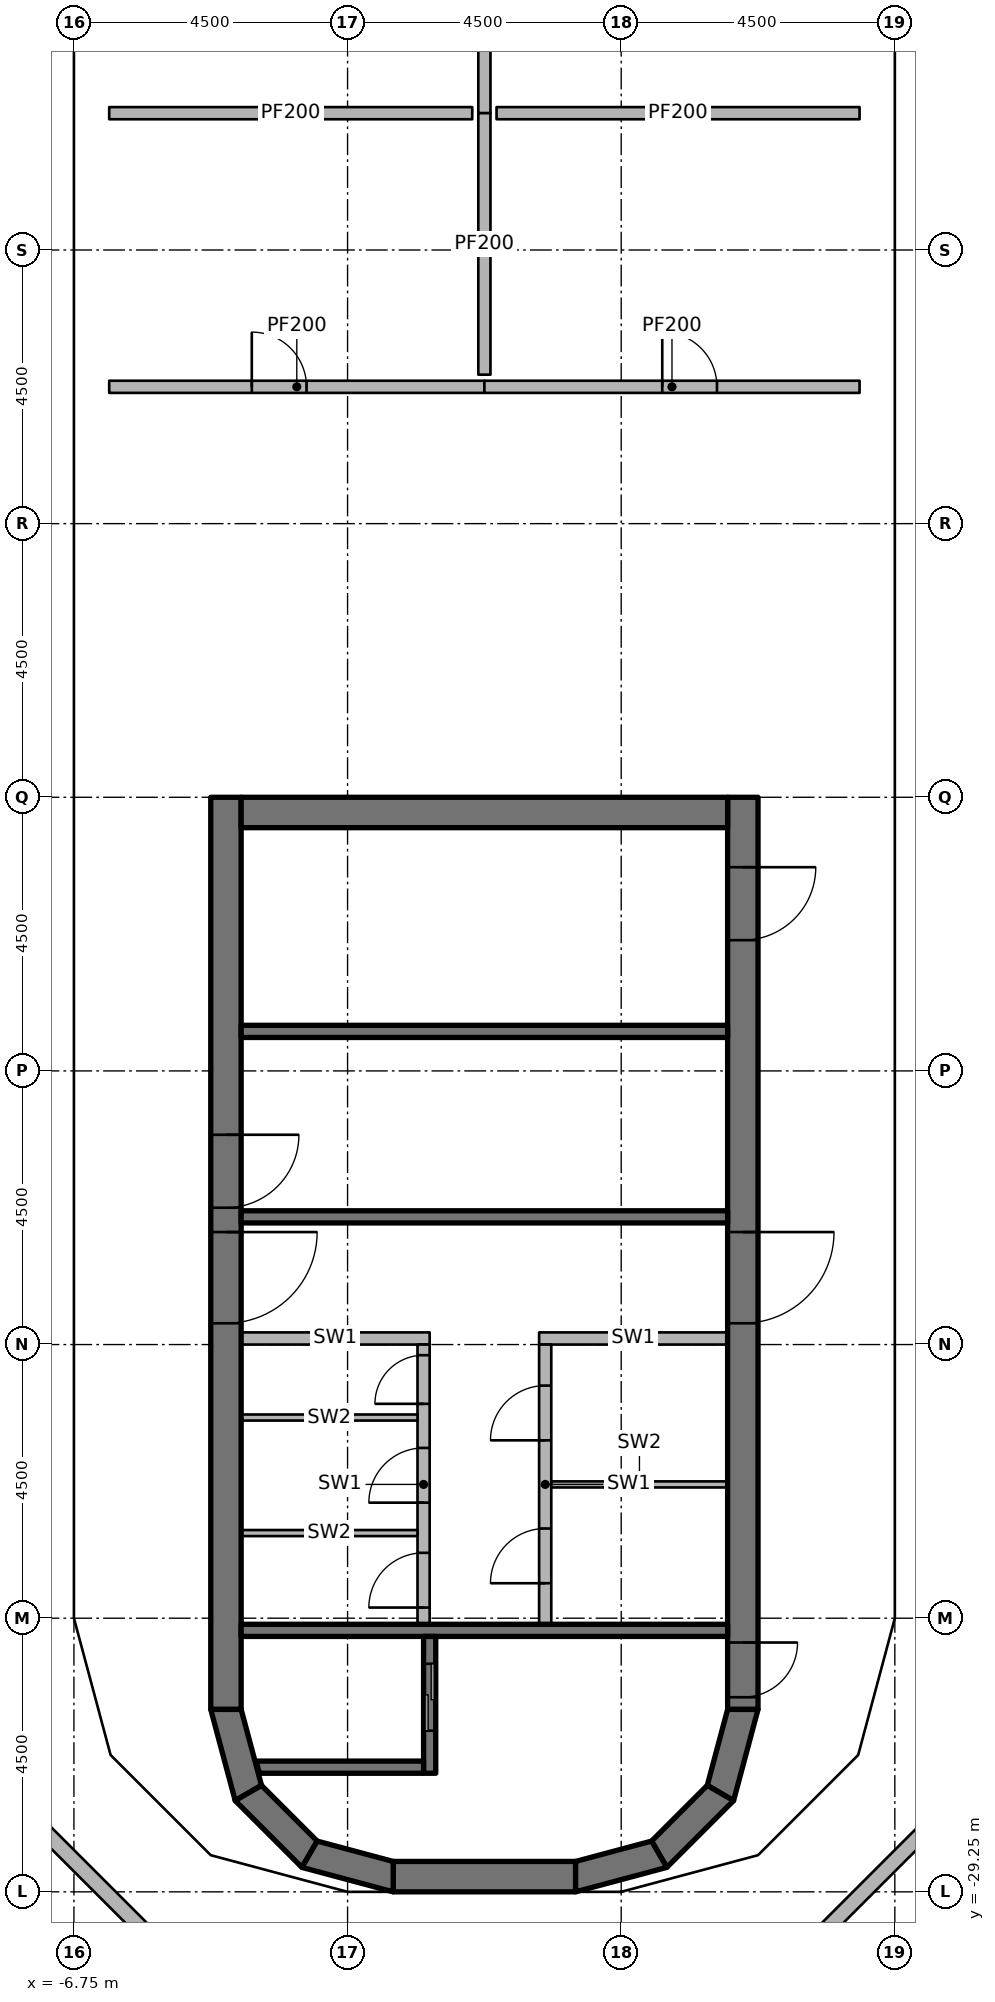
"""IFC4 building model, lengths in metres.
Left out: names, types, materials, properties, quantities, classifications, styles, units other than length and angle.
Written with IfcOpenShell. Run it as: python <this file> out.ifc"""

import sys

from ifc_helpers import new_model, si_unit, direction, frame, frame_2d, origin, origin_2d, place, context, subcontext, project, spatial, polyline, rectangle, outline, extrude, element, fill, save


model = new_model("IFC4")
c1 = context("Model", 3, precision=1e-05, world=origin(), true_north=direction((0.0, 1.0)))
c2 = subcontext(c1, "Body", "Model", "MODEL_VIEW")
j1 = project(units=[si_unit("LENGTHUNIT", "METRE"), si_unit("PLANEANGLEUNIT", "RADIAN")], contexts=[c1])
p1 = place(None, origin())
s1 = spatial("IfcSite", under=j1, at=p1, CompositionType="ELEMENT")
p2 = place(p1, origin())
s2 = spatial("IfcBuilding", under=s1, at=p2, CompositionType="ELEMENT")
p3 = place(p2, frame((0.0, 0.0, 309.6)))
s3 = spatial("IfcBuildingStorey", under=s2, at=p3, CompositionType="ELEMENT", Elevation=309.6)
for number, where, z_axis, x_axis in (
    (1, (-6.25, -24.65, 0.0), (0.0, 0.0, 1.0), (1.0, 0.0, 0.0)),
    (2, (-6.25, -20.25, 0.0), (0.0, 0.0, 1.0), (1.0, 0.0, 0.0)),
    (3, (-6.25, -15.75, 0.0), (0.0, 0.0, 1.0), (1.0, 0.0, 0.0)),
    (4, (-6.25, -10.75, 0.0), (0.0, 0.0, 1.0), (1.0, 0.0, 0.0)),
    (5, (-6.25, -6.25, 0.0), (0.0, 0.0, 1.0), (1.0, 0.0, 0.0)),
    (6, (6.25, -24.65, 0.0), (0.0, 0.0, 1.0), (1.0, 0.0, 0.0)),
    (7, (6.25, -20.25, 0.0), (0.0, 0.0, 1.0), (1.0, 0.0, 0.0)),
    (8, (6.25, -15.75, 0.0), (0.0, 0.0, 1.0), (1.0, 0.0, 0.0)),
    (9, (6.25, -10.75, 0.0), (0.0, 0.0, 1.0), (1.0, 0.0, 0.0)),
    (10, (6.25, -6.25, 0.0), (0.0, 0.0, 1.0), (1.0, 0.0, 0.0)),
):
    element("IfcColumn", number, at=place(p3, frame(where, z_axis=z_axis, x_axis=x_axis)), inside=s3, PredefinedType="COLUMN", context=c2, shape_type="SweptSolid", body=[
        extrude(rectangle(XDim=0.6, YDim=0.6, at=origin_2d()), origin(), (0.0, 0.0, 1.0), 3.45),
    ])
p4 = place(p3, frame((-4.25, -11.25, 0.0), z_axis=(0.0, 0.0, 1.0), x_axis=(0.0, -1.0, 0.0)))
e11 = element("IfcWall", 11, at=p4, inside=s3, PredefinedType="SHEAR", context=c2, shape_type="SweptSolid", body=[
    extrude(rectangle(XDim=15.0, YDim=0.5, at=frame_2d((7.5, 0.0))), origin(), (0.0, 0.0, 1.0), 3.6),
])
p5 = place(p4, frame((7.15, 0.0, 0.0)))
e12 = element("IfcOpeningElement", 12, at=p5, cuts=e11, PredefinedType="OPENING", context=c2, shape_type="SweptSolid", body=[
    extrude(rectangle(XDim=1.5, YDim=2.3, at=frame_2d((0.75, 1.15))), frame((0.0, 0.26, 0.0), z_axis=(0.0, -1.0, 0.0), x_axis=(1.0, 0.0, 0.0)), (0.0, 0.0, 1.0), 0.52),
])
p6 = place(p4, frame((5.55, 0.0, 0.0)))
e13 = element("IfcOpeningElement", 13, at=p6, cuts=e11, PredefinedType="OPENING", context=c2, shape_type="SweptSolid", body=[
    extrude(rectangle(XDim=1.2, YDim=2.1, at=frame_2d((0.6, 1.05))), frame((0.0, 0.26, 0.0), z_axis=(0.0, -1.0, 0.0), x_axis=(1.0, 0.0, 0.0)), (0.0, 0.0, 1.0), 0.52),
])
p7 = place(p3, frame((4.25, -11.25, 0.0), z_axis=(0.0, 0.0, 1.0), x_axis=(0.0, -1.0, 0.0)))
e14 = element("IfcWall", 14, at=p7, inside=s3, PredefinedType="SHEAR", context=c2, shape_type="SweptSolid", body=[
    extrude(rectangle(XDim=15.0, YDim=0.5, at=frame_2d((7.5, 0.0))), origin(), (0.0, 0.0, 1.0), 3.6),
])
p8 = place(p7, frame((7.15, 0.0, 0.0)))
e15 = element("IfcOpeningElement", 15, at=p8, cuts=e14, PredefinedType="OPENING", context=c2, shape_type="SweptSolid", body=[
    extrude(rectangle(XDim=1.5, YDim=2.3, at=frame_2d((0.75, 1.15))), frame((0.0, 0.26, 0.0), z_axis=(0.0, -1.0, 0.0), x_axis=(1.0, 0.0, 0.0)), (0.0, 0.0, 1.0), 0.52),
])
p9 = place(p7, frame((13.9, 0.0, 0.0)))
e16 = element("IfcOpeningElement", 16, at=p9, cuts=e14, PredefinedType="OPENING", context=c2, shape_type="SweptSolid", body=[
    extrude(rectangle(XDim=0.9, YDim=2.1, at=frame_2d((0.45, 1.05))), frame((0.0, 0.26, 0.0), z_axis=(0.0, -1.0, 0.0), x_axis=(1.0, 0.0, 0.0)), (0.0, 0.0, 1.0), 0.52),
])
p10 = place(p7, frame((1.15, 0.0, 0.0)))
e17 = element("IfcOpeningElement", 17, at=p10, cuts=e14, PredefinedType="OPENING", context=c2, shape_type="SweptSolid", body=[
    extrude(rectangle(XDim=1.2, YDim=2.1, at=frame_2d((0.6, 1.05))), frame((0.0, 0.26, 0.0), z_axis=(0.0, -1.0, 0.0), x_axis=(1.0, 0.0, 0.0)), (0.0, 0.0, 1.0), 0.52),
])
p11 = place(p3, frame((-4.0, -11.5, 0.0), z_axis=(0.0, 0.0, 1.0), x_axis=(1.0, 0.0, 0.0)))
e18 = element("IfcWall", 18, at=p11, inside=s3, PredefinedType="SHEAR", context=c2, shape_type="SweptSolid", body=[
    extrude(rectangle(XDim=8.0, YDim=0.5, at=frame_2d((4.0, 0.0))), origin(), (0.0, 0.0, 1.0), 3.6),
])
p12 = place(p3, frame((-1.5, -29.0, 0.0), z_axis=(0.0, 0.0, 1.0), x_axis=(1.0, 0.0, 0.0)))
e19 = element("IfcWall", 19, at=p12, inside=s3, PredefinedType="SHEAR", context=c2, shape_type="SweptSolid", body=[
    extrude(rectangle(XDim=3.0, YDim=0.5, at=frame_2d((1.5, 0.0))), origin(), (0.0, 0.0, 1.0), 3.6),
])
p13 = place(p3, origin())
e20 = element("IfcWall", 20, at=p13, inside=s3, PredefinedType="SHEAR", context=c2, shape_type="SweptSolid", body=[
    extrude(outline(polyline([(-4.5, -26.25), (-4.098, -27.75), (-3.665, -27.5), (-4.0, -26.25), (-4.5, -26.25)])), origin(), (0.0, 0.0, 1.0), 3.6),
])
p14 = place(p3, origin())
e21 = element("IfcWall", 21, at=p14, inside=s3, PredefinedType="SHEAR", context=c2, shape_type="SweptSolid", body=[
    extrude(outline(polyline([(-4.098, -27.75), (-3.0, -28.848), (-2.75, -28.415), (-3.665, -27.5), (-4.098, -27.75)])), origin(), (0.0, 0.0, 1.0), 3.6),
])
p15 = place(p3, origin())
e22 = element("IfcWall", 22, at=p15, inside=s3, PredefinedType="SHEAR", context=c2, shape_type="SweptSolid", body=[
    extrude(outline(polyline([(-3.0, -28.848), (-1.5, -29.25), (-1.5, -28.75), (-2.75, -28.415), (-3.0, -28.848)])), origin(), (0.0, 0.0, 1.0), 3.6),
])
p16 = place(p3, origin())
e23 = element("IfcWall", 23, at=p16, inside=s3, PredefinedType="SHEAR", context=c2, shape_type="SweptSolid", body=[
    extrude(outline(polyline([(4.5, -26.25), (4.098, -27.75), (3.665, -27.5), (4.0, -26.25), (4.5, -26.25)])), origin(), (0.0, 0.0, 1.0), 3.6),
])
p17 = place(p3, origin())
e24 = element("IfcWall", 24, at=p17, inside=s3, PredefinedType="SHEAR", context=c2, shape_type="SweptSolid", body=[
    extrude(outline(polyline([(4.098, -27.75), (3.0, -28.848), (2.75, -28.415), (3.665, -27.5), (4.098, -27.75)])), origin(), (0.0, 0.0, 1.0), 3.6),
])
p18 = place(p3, origin())
e25 = element("IfcWall", 25, at=p18, inside=s3, PredefinedType="SHEAR", context=c2, shape_type="SweptSolid", body=[
    extrude(outline(polyline([(3.0, -28.848), (1.5, -29.25), (1.5, -28.75), (2.75, -28.415), (3.0, -28.848)])), origin(), (0.0, 0.0, 1.0), 3.6),
])
p19 = place(p3, origin())
e26 = element("IfcWall", 26, at=p19, inside=s3, PredefinedType="PARAPET", context=c2, shape_type="SweptSolid", body=[
    extrude(outline(polyline([(-5.421, -30.243), (-7.743, -27.921), (-7.519, -27.792), (-5.292, -30.019), (-5.421, -30.243)])), origin(), (0.0, 0.0, 1.0), 1.22),
])
p20 = place(p3, origin())
e27 = element("IfcWall", 27, at=p20, inside=s3, PredefinedType="PARAPET", context=c2, shape_type="SweptSolid", body=[
    extrude(outline(polyline([(7.743, -27.921), (5.421, -30.243), (5.292, -30.019), (7.519, -27.792), (7.743, -27.921)])), origin(), (0.0, 0.0, 1.0), 1.22),
])
p21 = place(p3, frame((4.0, -24.95, 0.0), z_axis=(0.0, 0.0, 1.0), x_axis=(-1.0, 0.0, 0.0)))
e28 = element("IfcWall", 28, at=p21, inside=s3, PredefinedType="SHEAR", context=c2, shape_type="SweptSolid", body=[
    extrude(rectangle(XDim=8.0, YDim=0.2, at=frame_2d((4.0, 0.0))), origin(), (0.0, 0.0, 1.0), 3.45),
])
p22 = place(p3, frame((-0.9, -27.3, 0.0), z_axis=(0.0, 0.0, 1.0), x_axis=(0.0, 1.0, 0.0)))
e29 = element("IfcWall", 29, at=p22, inside=s3, PredefinedType="SHEAR", context=c2, shape_type="SweptSolid", body=[
    extrude(rectangle(XDim=2.25, YDim=0.2, at=frame_2d((1.125, 0.0))), origin(), (0.0, 0.0, 1.0), 3.45),
])
p23 = place(p22, frame((0.7, 0.0, 0.0)))
e30 = element("IfcOpeningElement", 30, at=p23, cuts=e29, PredefinedType="OPENING", context=c2, shape_type="SweptSolid", body=[
    extrude(rectangle(XDim=1.1, YDim=2.3, at=frame_2d((0.55, 1.15))), frame((0.0, 0.11, 0.0), z_axis=(0.0, -1.0, 0.0), x_axis=(1.0, 0.0, 0.0)), (0.0, 0.0, 1.0), 0.22),
])
p24 = place(p3, origin())
e31 = element("IfcWall", 31, at=p24, inside=s3, PredefinedType="SHEAR", context=c2, shape_type="SweptSolid", body=[
    extrude(outline(polyline([(-1.0, -27.1), (-3.755, -27.1), (-3.701, -27.3), (-1.0, -27.3), (-1.0, -27.1)])), origin(), (0.0, 0.0, 1.0), 3.45),
])
for number, where, z_axis, x_axis in (
    (32, (4.0, -18.15, 0.0), (0.0, 0.0, 1.0), (-1.0, 0.0, 0.0)),
    (33, (4.0, -15.1, 0.0), (0.0, 0.0, 1.0), (-1.0, 0.0, 0.0)),
):
    element("IfcWall", number, at=place(p3, frame(where, z_axis=z_axis, x_axis=x_axis)), inside=s3, PredefinedType="SHEAR", context=c2, shape_type="SweptSolid", body=[
        extrude(rectangle(XDim=8.0, YDim=0.2, at=frame_2d((4.0, 0.0))), origin(), (0.0, 0.0, 1.0), 3.45),
    ])
p25 = place(p3, frame((4.0, -20.15, 0.0), z_axis=(0.0, 0.0, 1.0), x_axis=(-1.0, 0.0, 0.0)))
e34 = element("IfcWall", 34, at=p25, inside=s3, PredefinedType="PARTITIONING", context=c2, shape_type="SweptSolid", body=[
    extrude(rectangle(XDim=3.1, YDim=0.2, at=frame_2d((1.55, 0.0))), origin(), (0.0, 0.0, 1.0), 3.45),
])
p26 = place(p3, frame((1.0, -24.85, 0.0), z_axis=(0.0, 0.0, 1.0), x_axis=(0.0, 1.0, 0.0)))
e35 = element("IfcWall", 35, at=p26, inside=s3, PredefinedType="PARTITIONING", context=c2, shape_type="SweptSolid", body=[
    extrude(rectangle(XDim=4.6, YDim=0.2, at=frame_2d((2.3, 0.0))), origin(), (0.0, 0.0, 1.0), 3.45),
])
p27 = place(p26, frame((0.675, 0.0, 0.0)))
e36 = element("IfcOpeningElement", 36, at=p27, cuts=e35, PredefinedType="OPENING", context=c2, shape_type="SweptSolid", body=[
    extrude(rectangle(XDim=0.9, YDim=2.1, at=frame_2d((0.45, 1.05))), frame((0.0, 0.11, 0.0), z_axis=(0.0, -1.0, 0.0), x_axis=(1.0, 0.0, 0.0)), (0.0, 0.0, 1.0), 0.22),
])
p28 = place(p26, frame((3.025, 0.0, 0.0)))
e37 = element("IfcOpeningElement", 37, at=p28, cuts=e35, PredefinedType="OPENING", context=c2, shape_type="SweptSolid", body=[
    extrude(rectangle(XDim=0.9, YDim=2.1, at=frame_2d((0.45, 1.05))), frame((0.0, 0.11, 0.0), z_axis=(0.0, -1.0, 0.0), x_axis=(1.0, 0.0, 0.0)), (0.0, 0.0, 1.0), 0.22),
])
p29 = place(p3, frame((-0.9, -20.15, 0.0), z_axis=(0.0, 0.0, 1.0), x_axis=(-1.0, 0.0, 0.0)))
e38 = element("IfcWall", 38, at=p29, inside=s3, PredefinedType="PARTITIONING", context=c2, shape_type="SweptSolid", body=[
    extrude(rectangle(XDim=3.1, YDim=0.2, at=frame_2d((1.55, 0.0))), origin(), (0.0, 0.0, 1.0), 3.45),
])
p30 = place(p3, frame((-1.0, -24.85, 0.0), z_axis=(0.0, 0.0, 1.0), x_axis=(0.0, 1.0, 0.0)))
e39 = element("IfcWall", 39, at=p30, inside=s3, PredefinedType="PARTITIONING", context=c2, shape_type="SweptSolid", body=[
    extrude(rectangle(XDim=4.6, YDim=0.2, at=frame_2d((2.3, 0.0))), origin(), (0.0, 0.0, 1.0), 3.45),
])
p31 = place(p30, frame((0.275, 0.0, 0.0)))
e40 = element("IfcOpeningElement", 40, at=p31, cuts=e39, PredefinedType="OPENING", context=c2, shape_type="SweptSolid", body=[
    extrude(rectangle(XDim=0.9, YDim=2.1, at=frame_2d((0.45, 1.05))), frame((0.0, 0.11, 0.0), z_axis=(0.0, -1.0, 0.0), x_axis=(1.0, 0.0, 0.0)), (0.0, 0.0, 1.0), 0.22),
])
p32 = place(p30, frame((2.0, 0.0, 0.0)))
e41 = element("IfcOpeningElement", 41, at=p32, cuts=e39, PredefinedType="OPENING", context=c2, shape_type="SweptSolid", body=[
    extrude(rectangle(XDim=0.9, YDim=2.1, at=frame_2d((0.45, 1.05))), frame((0.0, 0.11, 0.0), z_axis=(0.0, -1.0, 0.0), x_axis=(1.0, 0.0, 0.0)), (0.0, 0.0, 1.0), 0.22),
])
p33 = place(p30, frame((3.625, 0.0, 0.0)))
e42 = element("IfcOpeningElement", 42, at=p33, cuts=e39, PredefinedType="OPENING", context=c2, shape_type="SweptSolid", body=[
    extrude(rectangle(XDim=0.8, YDim=2.1, at=frame_2d((0.4, 1.05))), frame((0.0, 0.11, 0.0), z_axis=(0.0, -1.0, 0.0), x_axis=(1.0, 0.0, 0.0)), (0.0, 0.0, 1.0), 0.22),
])
for number, where, z_axis, x_axis in (
    (43, (4.0, -22.55, 0.0), (0.0, 0.0, 1.0), (-1.0, 0.0, 0.0)),
    (44, (-1.1, -23.35, 0.0), (0.0, 0.0, 1.0), (-1.0, 0.0, 0.0)),
    (45, (-1.1, -21.45, 0.0), (0.0, 0.0, 1.0), (-1.0, 0.0, 0.0)),
):
    element("IfcWall", number, at=place(p3, frame(where, z_axis=z_axis, x_axis=x_axis)), inside=s3, PredefinedType="PARTITIONING", context=c2, shape_type="SweptSolid", body=[
        extrude(rectangle(XDim=2.9, YDim=0.1, at=frame_2d((1.45, 0.0))), origin(), (0.0, 0.0, 1.0), 3.45),
    ])
p34 = place(p3, frame((-6.17, -4.5, 0.0), z_axis=(0.0, 0.0, 1.0), x_axis=(1.0, 0.0, 0.0)))
e46 = element("IfcWall", 46, at=p34, inside=s3, PredefinedType="PARTITIONING", context=c2, shape_type="SweptSolid", body=[
    extrude(rectangle(XDim=6.17, YDim=0.2, at=frame_2d((3.085, 0.0))), origin(), (0.0, 0.0, 1.0), 2.51),
])
p35 = place(p34, frame((2.345, 0.0, 0.0)))
e47 = element("IfcOpeningElement", 47, at=p35, cuts=e46, PredefinedType="OPENING", context=c2, shape_type="SweptSolid", body=[
    extrude(rectangle(XDim=0.9, YDim=2.1, at=frame_2d((0.45, 1.05))), frame((0.0, 0.11, 0.0), z_axis=(0.0, -1.0, 0.0), x_axis=(1.0, 0.0, 0.0)), (0.0, 0.0, 1.0), 0.22),
])
p36 = place(p3, frame((0.0, -4.5, 0.0), z_axis=(0.0, 0.0, 1.0), x_axis=(1.0, 0.0, 0.0)))
e48 = element("IfcWall", 48, at=p36, inside=s3, PredefinedType="PARTITIONING", context=c2, shape_type="SweptSolid", body=[
    extrude(rectangle(XDim=6.17, YDim=0.2, at=frame_2d((3.085, 0.0))), origin(), (0.0, 0.0, 1.0), 2.51),
])
p37 = place(p36, frame((2.925, 0.0, 0.0)))
e49 = element("IfcOpeningElement", 49, at=p37, cuts=e48, PredefinedType="OPENING", context=c2, shape_type="SweptSolid", body=[
    extrude(rectangle(XDim=0.9, YDim=2.1, at=frame_2d((0.45, 1.05))), frame((0.0, 0.11, 0.0), z_axis=(0.0, -1.0, 0.0), x_axis=(1.0, 0.0, 0.0)), (0.0, 0.0, 1.0), 0.22),
])
p38 = place(p3, frame((0.0, 4.3, 0.0), z_axis=(0.0, 0.0, 1.0), x_axis=(0.0, -1.0, 0.0)))
e50 = element("IfcWall", 50, at=p38, inside=s3, PredefinedType="PARTITIONING", context=c2, shape_type="SweptSolid", body=[
    extrude(rectangle(XDim=4.3, YDim=0.2, at=frame_2d((2.15, 0.0))), origin(), (0.0, 0.0, 1.0), 2.828),
])
for number, where, z_axis, x_axis in (
    (51, (-0.2, 0.0, 0.0), (0.0, 0.0, 1.0), (-1.0, 0.0, 0.0)),
    (52, (6.17, 0.0, 0.0), (0.0, 0.0, 1.0), (-1.0, 0.0, 0.0)),
):
    element("IfcWall", number, at=place(p3, frame(where, z_axis=z_axis, x_axis=x_axis)), inside=s3, PredefinedType="PARTITIONING", context=c2, shape_type="SweptSolid", body=[
        extrude(rectangle(XDim=5.97, YDim=0.2, at=frame_2d((2.985, 0.0))), origin(), (0.0, 0.0, 1.0), 2.51),
    ])
p39 = place(p3, frame((0.0, 0.0, 0.0), z_axis=(0.0, 0.0, 1.0), x_axis=(0.0, -1.0, 0.0)))
e53 = element("IfcWall", 53, at=p39, inside=s3, PredefinedType="PARTITIONING", context=c2, shape_type="SweptSolid", body=[
    extrude(rectangle(XDim=4.3, YDim=0.2, at=frame_2d((2.15, 0.0))), origin(), (0.0, 0.0, 1.0), 2.828),
])
p40 = place(p8, origin())
e54 = element("IfcDoor", 54, at=p40, inside=s3, OperationType="DOUBLE_DOOR_SINGLE_SWING", PredefinedType="DOOR", context=c2, shape_type="SweptSolid", body=[
    extrude(rectangle(XDim=1.5, YDim=2.3, at=frame_2d((0.75, 1.15))), frame((0.0, 0.025, 0.0), z_axis=(0.0, -1.0, 0.0), x_axis=(1.0, 0.0, 0.0)), (0.0, 0.0, 1.0), 0.05),
])
fill(e15, e54)
p41 = place(p5, origin())
e55 = element("IfcDoor", 55, at=p41, inside=s3, OperationType="DOUBLE_DOOR_SINGLE_SWING", PredefinedType="DOOR", context=c2, shape_type="SweptSolid", body=[
    extrude(rectangle(XDim=1.5, YDim=2.3, at=frame_2d((0.75, 1.15))), frame((0.0, 0.025, 0.0), z_axis=(0.0, -1.0, 0.0), x_axis=(1.0, 0.0, 0.0)), (0.0, 0.0, 1.0), 0.05),
])
fill(e12, e55)
p42 = place(p9, origin())
e56 = element("IfcDoor", 56, at=p42, inside=s3, OperationType="SINGLE_SWING_RIGHT", PredefinedType="DOOR", context=c2, shape_type="SweptSolid", body=[
    extrude(rectangle(XDim=0.9, YDim=2.1, at=frame_2d((0.45, 1.05))), frame((0.0, 0.025, 0.0), z_axis=(0.0, -1.0, 0.0), x_axis=(1.0, 0.0, 0.0)), (0.0, 0.0, 1.0), 0.05),
])
fill(e16, e56)
p43 = place(p6, origin())
e57 = element("IfcDoor", 57, at=p43, inside=s3, OperationType="SINGLE_SWING_LEFT", PredefinedType="DOOR", context=c2, shape_type="SweptSolid", body=[
    extrude(rectangle(XDim=1.2, YDim=2.1, at=frame_2d((0.6, 1.05))), frame((0.0, 0.025, 0.0), z_axis=(0.0, -1.0, 0.0), x_axis=(1.0, 0.0, 0.0)), (0.0, 0.0, 1.0), 0.05),
])
fill(e13, e57)
p44 = place(p10, origin())
e58 = element("IfcDoor", 58, at=p44, inside=s3, OperationType="SINGLE_SWING_LEFT", PredefinedType="DOOR", context=c2, shape_type="SweptSolid", body=[
    extrude(rectangle(XDim=1.2, YDim=2.1, at=frame_2d((0.6, 1.05))), frame((0.0, 0.025, 0.0), z_axis=(0.0, -1.0, 0.0), x_axis=(1.0, 0.0, 0.0)), (0.0, 0.0, 1.0), 0.05),
])
fill(e17, e58)
p45 = place(p23, origin())
e59 = element("IfcDoor", 59, at=p45, inside=s3, OperationType="DOUBLE_DOOR_SLIDING", PredefinedType="DOOR", context=c2, shape_type="SweptSolid", body=[
    extrude(rectangle(XDim=1.1, YDim=2.3, at=frame_2d((0.55, 1.15))), frame((0.0, 0.025, 0.0), z_axis=(0.0, -1.0, 0.0), x_axis=(1.0, 0.0, 0.0)), (0.0, 0.0, 1.0), 0.05),
])
fill(e30, e59)
p46 = place(p27, origin())
e60 = element("IfcDoor", 60, at=p46, inside=s3, OperationType="SINGLE_SWING_RIGHT", PredefinedType="DOOR", context=c2, shape_type="SweptSolid", body=[
    extrude(rectangle(XDim=0.9, YDim=2.1, at=frame_2d((0.45, 1.05))), frame((0.0, 0.025, 0.0), z_axis=(0.0, -1.0, 0.0), x_axis=(1.0, 0.0, 0.0)), (0.0, 0.0, 1.0), 0.05),
])
fill(e36, e60)
p47 = place(p28, origin())
e61 = element("IfcDoor", 61, at=p47, inside=s3, OperationType="SINGLE_SWING_LEFT", PredefinedType="DOOR", context=c2, shape_type="SweptSolid", body=[
    extrude(rectangle(XDim=0.9, YDim=2.1, at=frame_2d((0.45, 1.05))), frame((0.0, 0.025, 0.0), z_axis=(0.0, -1.0, 0.0), x_axis=(1.0, 0.0, 0.0)), (0.0, 0.0, 1.0), 0.05),
])
fill(e37, e61)
p48 = place(p31, origin())
e62 = element("IfcDoor", 62, at=p48, inside=s3, OperationType="SINGLE_SWING_RIGHT", PredefinedType="DOOR", context=c2, shape_type="SweptSolid", body=[
    extrude(rectangle(XDim=0.9, YDim=2.1, at=frame_2d((0.45, 1.05))), frame((0.0, 0.025, 0.0), z_axis=(0.0, -1.0, 0.0), x_axis=(1.0, 0.0, 0.0)), (0.0, 0.0, 1.0), 0.05),
])
fill(e40, e62)
p49 = place(p32, origin())
e63 = element("IfcDoor", 63, at=p49, inside=s3, OperationType="SINGLE_SWING_RIGHT", PredefinedType="DOOR", context=c2, shape_type="SweptSolid", body=[
    extrude(rectangle(XDim=0.9, YDim=2.1, at=frame_2d((0.45, 1.05))), frame((0.0, 0.025, 0.0), z_axis=(0.0, -1.0, 0.0), x_axis=(1.0, 0.0, 0.0)), (0.0, 0.0, 1.0), 0.05),
])
fill(e41, e63)
p50 = place(p33, origin())
e64 = element("IfcDoor", 64, at=p50, inside=s3, OperationType="SINGLE_SWING_LEFT", PredefinedType="DOOR", context=c2, shape_type="SweptSolid", body=[
    extrude(rectangle(XDim=0.8, YDim=2.1, at=frame_2d((0.4, 1.05))), frame((0.0, 0.025, 0.0), z_axis=(0.0, -1.0, 0.0), x_axis=(1.0, 0.0, 0.0)), (0.0, 0.0, 1.0), 0.05),
])
fill(e42, e64)
p51 = place(p35, origin())
e65 = element("IfcDoor", 65, at=p51, inside=s3, OperationType="SINGLE_SWING_LEFT", PredefinedType="DOOR", context=c2, shape_type="SweptSolid", body=[
    extrude(rectangle(XDim=0.9, YDim=2.1, at=frame_2d((0.45, 1.05))), frame((0.0, 0.025, 0.0), z_axis=(0.0, -1.0, 0.0), x_axis=(1.0, 0.0, 0.0)), (0.0, 0.0, 1.0), 0.05),
])
fill(e47, e65)
p52 = place(p37, origin())
e66 = element("IfcDoor", 66, at=p52, inside=s3, OperationType="SINGLE_SWING_LEFT", PredefinedType="DOOR", context=c2, shape_type="SweptSolid", body=[
    extrude(rectangle(XDim=0.9, YDim=2.1, at=frame_2d((0.45, 1.05))), frame((0.0, 0.025, 0.0), z_axis=(0.0, -1.0, 0.0), x_axis=(1.0, 0.0, 0.0)), (0.0, 0.0, 1.0), 0.05),
])
fill(e49, e66)
save(model, sys.argv[1])
